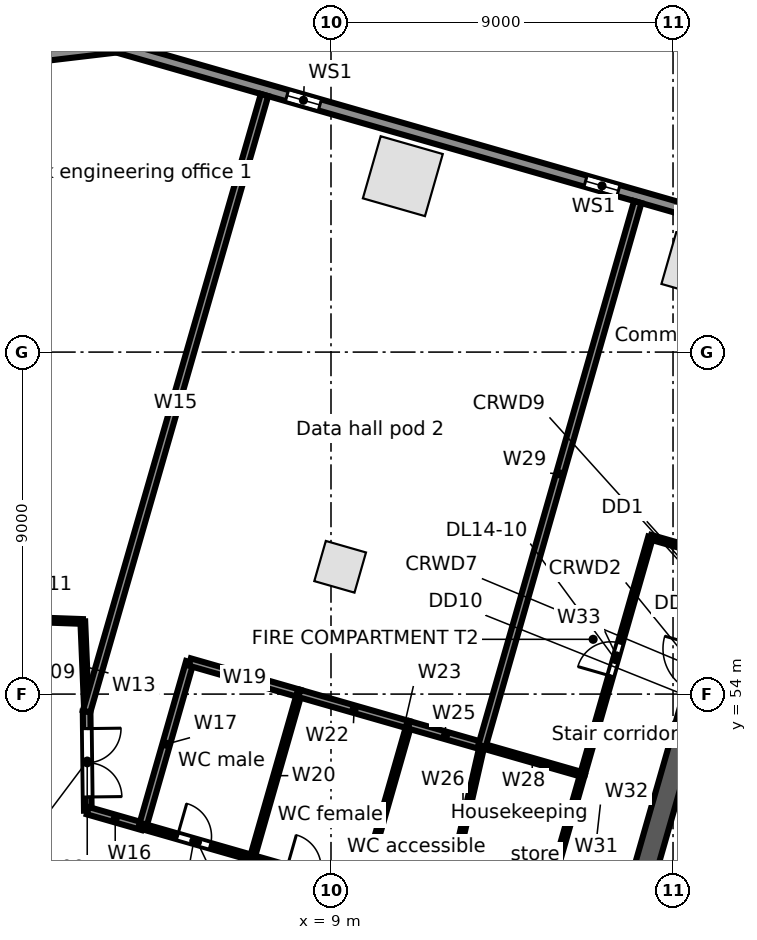
"""IFC4 building model, lengths in metres.
Left out: names, types, materials, properties, quantities, classifications, styles, units other than length and angle.
Written with IfcOpenShell. Run it as: python <this file> out.ifc"""

import sys

from ifc_helpers import new_model, si_unit, direction, frame, frame_2d, origin, origin_2d, place, context, subcontext, project, spatial, rectangle, extrude, element, fill, save


model = new_model("IFC4")
c1 = context("Model", 3, precision=1e-05, world=origin(), true_north=direction((0.0, 1.0)))
c2 = subcontext(c1, "Body", "Model", "MODEL_VIEW")
j1 = project(units=[si_unit("LENGTHUNIT", "METRE"), si_unit("PLANEANGLEUNIT", "RADIAN")], contexts=[c1])
p1 = place(None, origin())
s1 = spatial("IfcSite", under=j1, at=p1, CompositionType="ELEMENT")
p2 = place(p1, origin())
s2 = spatial("IfcBuilding", under=s1, at=p2, CompositionType="ELEMENT")
p3 = place(p2, frame((0.0, 0.0, 71.5)))
s3 = spatial("IfcBuildingStorey", under=s2, at=p3, CompositionType="ELEMENT", Elevation=71.5)
for number, where, z_axis, x_axis in (
    (1, (18.746, 65.376, 0.0), (0.0, 0.0, 1.0), (-0.961, 0.276, 0.0)),
    (2, (10.89, 67.629, 0.0), (0.0, 0.0, 1.0), (-0.961, 0.276, 0.0)),
):
    element("IfcColumn", number, at=place(p3, frame(where, z_axis=z_axis, x_axis=x_axis)), inside=s3, PredefinedType="COLUMN", context=c2, shape_type="SweptSolid", body=[
        extrude(rectangle(XDim=1.7, YDim=1.7, at=origin_2d()), origin(), (0.0, 0.0, 1.0), 5.0),
    ])
p4 = place(p3, frame((9.241, 57.35, 0.0), z_axis=(0.0, 0.0, 1.0), x_axis=(0.961261695938, -0.275637355817, 0.0)))
e3 = element("IfcColumn", 3, at=p4, inside=s3, PredefinedType="COLUMN", context=c2, shape_type="SweptSolid", body=[
    extrude(rectangle(XDim=1.1, YDim=1.1, at=origin_2d()), origin(), (0.0, 0.0, 1.0), 5.0),
])
p5 = place(p3, frame((3.335, 71.044, 0.0), z_axis=(0.0, 0.0, 1.0), x_axis=(0.961260130989, -0.275642813387, 0.0)))
e4 = element("IfcWall", 4, at=p5, inside=s3, PredefinedType="STANDARD", context=c2, shape_type="SweptSolid", body=[
    extrude(rectangle(XDim=32.741, YDim=0.3, at=frame_2d((16.371, 0.0))), origin(), (0.0, 0.0, 1.0), 4.68),
])
p6 = place(p5, frame((29.207, 0.0, 0.6)))
e5 = element("IfcOpeningElement", 5, at=p6, cuts=e4, PredefinedType="OPENING", context=c2, shape_type="SweptSolid", body=[
    extrude(rectangle(XDim=0.9, YDim=3.2, at=frame_2d((0.45, 1.6))), frame((0.0, 0.16, 0.0), z_axis=(0.0, -1.0, 0.0), x_axis=(1.0, 0.0, 0.0)), (0.0, 0.0, 1.0), 0.32),
])
p7 = place(p5, frame((21.034, 0.0, 0.6)))
e6 = element("IfcOpeningElement", 6, at=p7, cuts=e4, PredefinedType="OPENING", context=c2, shape_type="SweptSolid", body=[
    extrude(rectangle(XDim=0.9, YDim=3.2, at=frame_2d((0.45, 1.6))), frame((0.0, 0.16, 0.0), z_axis=(0.0, -1.0, 0.0), x_axis=(1.0, 0.0, 0.0)), (0.0, 0.0, 1.0), 0.32),
])
p8 = place(p5, frame((12.861, 0.0, 0.6)))
e7 = element("IfcOpeningElement", 7, at=p8, cuts=e4, PredefinedType="OPENING", context=c2, shape_type="SweptSolid", body=[
    extrude(rectangle(XDim=0.9, YDim=3.2, at=frame_2d((0.45, 1.6))), frame((0.0, 0.16, 0.0), z_axis=(0.0, -1.0, 0.0), x_axis=(1.0, 0.0, 0.0)), (0.0, 0.0, 1.0), 0.32),
])
p9 = place(p5, frame((4.688, 0.0, 0.6)))
e8 = element("IfcOpeningElement", 8, at=p9, cuts=e4, PredefinedType="OPENING", context=c2, shape_type="SweptSolid", body=[
    extrude(rectangle(XDim=0.9, YDim=3.2, at=frame_2d((0.45, 1.6))), frame((0.0, 0.16, 0.0), z_axis=(0.0, -1.0, 0.0), x_axis=(1.0, 0.0, 0.0)), (0.0, 0.0, 1.0), 0.32),
])
p10 = place(p3, frame((-3.076, 70.273, 0.0), z_axis=(0.0, 0.0, 1.0), x_axis=(0.993067743007, 0.117543429416, 0.0)))
e9 = element("IfcWall", 9, at=p10, inside=s3, PredefinedType="STANDARD", context=c2, shape_type="SweptSolid", body=[
    extrude(rectangle(XDim=6.516, YDim=0.3, at=frame_2d((3.258, 0.0))), origin(), (0.0, 0.0, 1.0), 4.68),
])
p11 = place(p3, frame((17.282, 49.427, 0.0), z_axis=(0.0, 0.0, 1.0), x_axis=(0.275631631629, 0.961263337304, 0.0)))
e10 = element("IfcWall", 10, at=p11, inside=s3, PredefinedType="SOLIDWALL", context=c2, shape_type="SweptSolid", body=[
    extrude(rectangle(XDim=10.8, YDim=0.6, at=frame_2d((5.4, 0.0))), origin(), (0.0, 0.0, 1.0), 4.68),
])
p12 = place(p11, frame((4.8, 0.0, 0.0)))
e11 = element("IfcOpeningElement", 11, at=p12, cuts=e10, PredefinedType="OPENING", context=c2, shape_type="SweptSolid", body=[
    extrude(rectangle(XDim=1.2, YDim=2.1, at=frame_2d((0.6, 1.05))), frame((0.0, 0.31, 0.0), z_axis=(0.0, -1.0, 0.0), x_axis=(1.0, 0.0, 0.0)), (0.0, 0.0, 1.0), 0.62),
])
p13 = place(p3, frame((0.0, 56.0, 0.0), z_axis=(0.0, 0.0, 1.0), x_axis=(0.999349313684, -0.036068673934, 0.0)))
e12 = element("IfcWall", 12, at=p13, inside=s3, PredefinedType="PARTITIONING", context=c2, shape_type="SweptSolid", body=[
    extrude(rectangle(XDim=2.471, YDim=0.125, at=frame_2d((1.235, 0.0))), origin(), (0.0, 0.0, 1.0), 4.68),
])
p14 = place(p13, frame((0.7, 0.0, 0.0)))
e13 = element("IfcOpeningElement", 13, at=p14, cuts=e12, PredefinedType="OPENING", context=c2, shape_type="SweptSolid", body=[
    extrude(rectangle(XDim=0.9, YDim=2.1, at=frame_2d((0.45, 1.05))), frame((0.0, 0.073, 0.0), z_axis=(0.0, -1.0, 0.0), x_axis=(1.0, 0.0, 0.0)), (0.0, 0.0, 1.0), 0.145),
])
p15 = place(p3, frame((2.469, 55.911, 0.0), z_axis=(0.0, 0.0, 1.0), x_axis=(0.042217300367, -0.999108452346, 0.0)))
e14 = element("IfcWall", 14, at=p15, inside=s3, PredefinedType="PARTITIONING", context=c2, shape_type="SweptSolid", body=[
    extrude(rectangle(XDim=2.371, YDim=0.125, at=frame_2d((1.186, 0.0))), origin(), (0.0, 0.0, 1.0), 4.68),
])
p16 = place(p3, frame((2.569, 53.542, 0.0), z_axis=(0.0, 0.0, 1.0), x_axis=(0.012252377394, -0.999924936807, 0.0)))
e15 = element("IfcWall", 15, at=p16, inside=s3, PredefinedType="PARTITIONING", context=c2, shape_type="SweptSolid", body=[
    extrude(rectangle(XDim=2.61, YDim=0.2, at=frame_2d((1.305, 0.0))), origin(), (0.0, 0.0, 1.0), 4.68),
])
p17 = place(p16, frame((0.45, 0.0, 0.0)))
e16 = element("IfcOpeningElement", 16, at=p17, cuts=e15, PredefinedType="OPENING", context=c2, shape_type="SweptSolid", body=[
    extrude(rectangle(XDim=1.8, YDim=2.1, at=frame_2d((0.9, 1.05))), frame((0.0, 0.11, 0.0), z_axis=(0.0, -1.0, 0.0), x_axis=(1.0, 0.0, 0.0)), (0.0, 0.0, 1.0), 0.22),
])
p18 = place(p3, frame((2.569, 53.542, 0.0), z_axis=(0.0, 0.0, 1.0), x_axis=(0.277281040764, 0.960788855281, 0.0)))
e17 = element("IfcWall", 17, at=p18, inside=s3, PredefinedType="PARTITIONING", context=c2, shape_type="SweptSolid", body=[
    extrude(rectangle(XDim=16.885, YDim=0.2, at=frame_2d((8.442, 0.0))), origin(), (0.0, 0.0, 1.0), 3.742),
])
p19 = place(p3, frame((2.601, 50.932, 0.0), z_axis=(0.0, 0.0, 1.0), x_axis=(0.961197773994, -0.27586018065, 0.0)))
e18 = element("IfcWall", 18, at=p19, inside=s3, PredefinedType="PARTITIONING", context=c2, shape_type="SweptSolid", body=[
    extrude(rectangle(XDim=1.5, YDim=0.2, at=frame_2d((0.75, 0.0))), origin(), (0.0, 0.0, 1.0), 4.68),
])
p20 = place(p3, frame((4.043, 50.518, 0.0), z_axis=(0.0, 0.0, 1.0), x_axis=(0.275745553681, 0.96123066411, 0.0)))
e19 = element("IfcWall", 19, at=p20, inside=s3, PredefinedType="PARTITIONING", context=c2, shape_type="SweptSolid", body=[
    extrude(rectangle(XDim=4.5, YDim=0.2, at=frame_2d((2.25, 0.0))), origin(), (0.0, 0.0, 1.0), 4.68),
])
p21 = place(p3, frame((4.043, 50.518, 0.0), z_axis=(0.0, 0.0, 1.0), x_axis=(0.961247103494, -0.275688240636, 0.0)))
e20 = element("IfcWall", 20, at=p21, inside=s3, PredefinedType="PARTITIONING", context=c2, shape_type="SweptSolid", body=[
    extrude(rectangle(XDim=3.0, YDim=0.15, at=frame_2d((1.5, 0.0))), origin(), (0.0, 0.0, 1.0), 4.68),
])
p22 = place(p21, frame((0.95, 0.0, 0.0)))
e21 = element("IfcOpeningElement", 21, at=p22, cuts=e20, PredefinedType="OPENING", context=c2, shape_type="SweptSolid", body=[
    extrude(rectangle(XDim=0.9, YDim=2.1, at=frame_2d((0.45, 1.05))), frame((0.0, 0.085, 0.0), z_axis=(0.0, -1.0, 0.0), x_axis=(1.0, 0.0, 0.0)), (0.0, 0.0, 1.0), 0.17),
])
p23 = place(p3, frame((5.284, 54.844, 0.0), z_axis=(0.0, 0.0, 1.0), x_axis=(0.961243927922, -0.275699312717, 0.0)))
e22 = element("IfcWall", 22, at=p23, inside=s3, PredefinedType="PARTITIONING", context=c2, shape_type="SweptSolid", body=[
    extrude(rectangle(XDim=2.999, YDim=0.2, at=frame_2d((1.5, 0.0))), origin(), (0.0, 0.0, 1.0), 4.68),
])
p24 = place(p3, frame((6.927, 49.691, 0.0), z_axis=(0.0, 0.0, 1.0), x_axis=(0.275530671241, 0.961292280841, 0.0)))
e23 = element("IfcWall", 23, at=p24, inside=s3, PredefinedType="PARTITIONING", context=c2, shape_type="SweptSolid", body=[
    extrude(rectangle(XDim=4.5, YDim=0.125, at=frame_2d((2.25, 0.0))), origin(), (0.0, 0.0, 1.0), 4.68),
])
p25 = place(p3, frame((6.927, 49.691, 0.0), z_axis=(0.0, 0.0, 1.0), x_axis=(0.961268664977, -0.27561305073, 0.0)))
e24 = element("IfcWall", 24, at=p25, inside=s3, PredefinedType="PARTITIONING", context=c2, shape_type="SweptSolid", body=[
    extrude(rectangle(XDim=3.0, YDim=0.15, at=frame_2d((1.5, 0.0))), origin(), (0.0, 0.0, 1.0), 3.742),
])
p26 = place(p25, frame((0.95, 0.0, 0.0)))
e25 = element("IfcOpeningElement", 25, at=p26, cuts=e24, PredefinedType="OPENING", context=c2, shape_type="SweptSolid", body=[
    extrude(rectangle(XDim=0.9, YDim=2.1, at=frame_2d((0.45, 1.05))), frame((0.0, 0.085, 0.0), z_axis=(0.0, -1.0, 0.0), x_axis=(1.0, 0.0, 0.0)), (0.0, 0.0, 1.0), 0.17),
])
p27 = place(p3, frame((8.167, 54.017, 0.0), z_axis=(0.0, 0.0, 1.0), x_axis=(0.961247103494, -0.275688240636, 0.0)))
e26 = element("IfcWall", 26, at=p27, inside=s3, PredefinedType="PARTITIONING", context=c2, shape_type="SweptSolid", body=[
    extrude(rectangle(XDim=3.0, YDim=0.2, at=frame_2d((1.5, 0.0))), origin(), (0.0, 0.0, 1.0), 3.742),
])
p28 = place(p3, frame((9.811, 48.864, 0.0), z_axis=(0.0, 0.0, 1.0), x_axis=(0.275545040649, 0.96128816209, 0.0)))
e27 = element("IfcWall", 27, at=p28, inside=s3, PredefinedType="PARTITIONING", context=c2, shape_type="SweptSolid", body=[
    extrude(rectangle(XDim=4.5, YDim=0.125, at=frame_2d((2.25, 0.0))), origin(), (0.0, 0.0, 1.0), 4.68),
])
p29 = place(p3, frame((11.051, 53.19, 0.0), z_axis=(0.0, 0.0, 1.0), x_axis=(0.961316434736, -0.275446387355, 0.0)))
e28 = element("IfcWall", 28, at=p29, inside=s3, PredefinedType="PARTITIONING", context=c2, shape_type="SweptSolid", body=[
    extrude(rectangle(XDim=2.0, YDim=0.2, at=frame_2d((1.0, 0.0))), origin(), (0.0, 0.0, 1.0), 4.68),
])
p30 = place(p3, frame((11.973, 48.244, 0.0), z_axis=(0.0, 0.0, 1.0), x_axis=(0.222117362571, 0.975019936845, 0.0)))
e29 = element("IfcWall", 29, at=p30, inside=s3, PredefinedType="PARTITIONING", context=c2, shape_type="SweptSolid", body=[
    extrude(rectangle(XDim=4.508, YDim=0.125, at=frame_2d((2.254, 0.0))), origin(), (0.0, 0.0, 1.0), 4.68),
])
p31 = place(p3, frame((12.974, 52.639, 0.0), z_axis=(0.0, 0.0, 1.0), x_axis=(0.961262138292, -0.275635813142, 0.0)))
e30 = element("IfcWall", 30, at=p31, inside=s3, PredefinedType="PARTITIONING", context=c2, shape_type="SweptSolid", body=[
    extrude(rectangle(XDim=2.749, YDim=0.125, at=frame_2d((1.375, 0.0))), origin(), (0.0, 0.0, 1.0), 4.68),
])
p32 = place(p3, frame((12.974, 52.639, 0.0), z_axis=(0.0, 0.0, 1.0), x_axis=(0.275299463768, 0.961358520662, 0.0)))
e31 = element("IfcWall", 31, at=p32, inside=s3, PredefinedType="PARTITIONING", context=c2, shape_type="SweptSolid", body=[
    extrude(rectangle(XDim=14.885, YDim=0.2, at=frame_2d((7.443, 0.0))), origin(), (0.0, 0.0, 1.0), 3.742),
])
p33 = place(p3, frame((14.928, 49.478, 0.0), z_axis=(0.0, 0.0, 1.0), x_axis=(0.275598116036, 0.961272946898, 0.0)))
e32 = element("IfcWall", 32, at=p33, inside=s3, PredefinedType="PARTITIONING", context=c2, shape_type="SweptSolid", body=[
    extrude(rectangle(XDim=2.5, YDim=0.125, at=frame_2d((1.25, 0.0))), origin(), (0.0, 0.0, 1.0), 4.68),
])
p34 = place(p3, frame((15.617, 51.881, 0.0), z_axis=(0.0, 0.0, 1.0), x_axis=(0.275703259795, 0.961242795832, 0.0)))
e33 = element("IfcWall", 33, at=p34, inside=s3, PredefinedType="PARTITIONING", context=c2, shape_type="SweptSolid", body=[
    extrude(rectangle(XDim=6.5, YDim=0.125, at=frame_2d((3.25, 0.0))), origin(), (0.0, 0.0, 1.0), 3.742),
])
p35 = place(p34, frame((2.7, 0.0, 0.0)))
e34 = element("IfcOpeningElement", 34, at=p35, cuts=e33, PredefinedType="OPENING", context=c2, shape_type="SweptSolid", body=[
    extrude(rectangle(XDim=0.9, YDim=2.1, at=frame_2d((0.45, 1.05))), frame((0.0, 0.073, 0.0), z_axis=(0.0, -1.0, 0.0), x_axis=(1.0, 0.0, 0.0)), (0.0, 0.0, 1.0), 0.145),
])
p36 = place(p3, frame((17.409, 58.129, 0.0), z_axis=(0.0, 0.0, 1.0), x_axis=(0.961253165474, -0.275667103345, 0.0)))
e35 = element("IfcWall", 35, at=p36, inside=s3, PredefinedType="PARTITIONING", context=c2, shape_type="SweptSolid", body=[
    extrude(rectangle(XDim=1.977, YDim=0.125, at=frame_2d((0.988, 0.0))), origin(), (0.0, 0.0, 1.0), 4.68),
])
p37 = place(p8, origin())
e36 = element("IfcWindow", 36, at=p37, inside=s3, PartitioningType="SINGLE_PANEL", PredefinedType="WINDOW", context=c2, shape_type="SweptSolid", body=[
    extrude(rectangle(XDim=0.9, YDim=3.2, at=frame_2d((0.45, 1.6))), frame((0.0, 0.03, 0.0), z_axis=(0.0, -1.0, 0.0), x_axis=(1.0, 0.0, 0.0)), (0.0, 0.0, 1.0), 0.06),
])
fill(e7, e36)
p38 = place(p9, origin())
e37 = element("IfcWindow", 37, at=p38, inside=s3, PartitioningType="SINGLE_PANEL", PredefinedType="WINDOW", context=c2, shape_type="SweptSolid", body=[
    extrude(rectangle(XDim=0.9, YDim=3.2, at=frame_2d((0.45, 1.6))), frame((0.0, 0.03, 0.0), z_axis=(0.0, -1.0, 0.0), x_axis=(1.0, 0.0, 0.0)), (0.0, 0.0, 1.0), 0.06),
])
fill(e8, e37)
p39 = place(p22, origin())
e38 = element("IfcDoor", 38, at=p39, inside=s3, OperationType="SINGLE_SWING_LEFT", PredefinedType="DOOR", context=c2, shape_type="SweptSolid", body=[
    extrude(rectangle(XDim=0.9, YDim=2.1, at=frame_2d((0.45, 1.05))), frame((0.0, 0.025, 0.0), z_axis=(0.0, -1.0, 0.0), x_axis=(1.0, 0.0, 0.0)), (0.0, 0.0, 1.0), 0.05),
])
fill(e21, e38)
p40 = place(p17, origin())
e39 = element("IfcDoor", 39, at=p40, inside=s3, OperationType="DOUBLE_DOOR_SINGLE_SWING", PredefinedType="DOOR", context=c2, shape_type="SweptSolid", body=[
    extrude(rectangle(XDim=1.8, YDim=2.1, at=frame_2d((0.9, 1.05))), frame((0.0, 0.025, 0.0), z_axis=(0.0, -1.0, 0.0), x_axis=(1.0, 0.0, 0.0)), (0.0, 0.0, 1.0), 0.05),
])
fill(e16, e39)
p41 = place(p35, origin())
e40 = element("IfcDoor", 40, at=p41, inside=s3, OperationType="SINGLE_SWING_LEFT", PredefinedType="DOOR", context=c2, shape_type="SweptSolid", body=[
    extrude(rectangle(XDim=0.9, YDim=2.1, at=frame_2d((0.45, 1.05))), frame((0.0, 0.025, 0.0), z_axis=(0.0, -1.0, 0.0), x_axis=(1.0, 0.0, 0.0)), (0.0, 0.0, 1.0), 0.05),
])
fill(e34, e40)
save(model, sys.argv[1])
